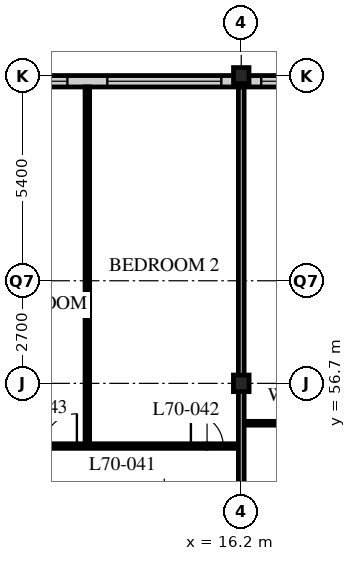
"""IFC4 building model, lengths in metres.
Left out: names, types, materials, properties, quantities, classifications, styles, units other than length and angle.
Written with IfcOpenShell. Run it as: python <this file> out.ifc"""

import sys

from ifc_helpers import new_model, si_unit, direction, frame, frame_2d, origin, origin_2d, place, context, subcontext, project, spatial, rectangle, i_section, extrude, element, fill, save


model = new_model("IFC4")
c1 = context("Model", 3, precision=1e-05, world=origin(), true_north=direction((0.0, 1.0)))
c2 = subcontext(c1, "Body", "Model", "MODEL_VIEW")
j1 = project(units=[si_unit("LENGTHUNIT", "METRE"), si_unit("PLANEANGLEUNIT", "RADIAN")], contexts=[c1])
p1 = place(None, origin())
s1 = spatial("IfcSite", under=j1, at=p1, CompositionType="ELEMENT")
p2 = place(p1, origin())
s2 = spatial("IfcBuilding", under=s1, at=p2, CompositionType="ELEMENT")
p3 = place(p2, frame((0.0, 0.0, 273.6)))
s3 = spatial("IfcBuildingStorey", under=s2, at=p3, CompositionType="ELEMENT", Elevation=273.6)
p4 = place(p3, frame((16.2, 56.7, 0.0), z_axis=(0.0, 0.0, 1.0), x_axis=(1.0, 0.0, 0.0)))
e1 = element("IfcColumn", 1, at=p4, inside=s3, PredefinedType="COLUMN", context=c2, shape_type="SweptSolid", body=[
    extrude(i_section(OverallWidth=0.412, OverallDepth=0.437, WebThickness=0.036, FlangeThickness=0.058, FilletRadius=0.015, at=origin_2d()), origin(), (0.0, 0.0, 1.0), 3.9),
])
p5 = place(p3, frame((16.2, 64.8, 0.0), z_axis=(0.0, 0.0, 1.0), x_axis=(1.0, 0.0, 0.0)))
e2 = element("IfcColumn", 2, at=p5, inside=s3, PredefinedType="COLUMN", context=c2, shape_type="SweptSolid", body=[
    extrude(i_section(OverallWidth=0.407, OverallDepth=0.419, WebThickness=0.031, FlangeThickness=0.049, FilletRadius=0.015, at=origin_2d()), origin(), (0.0, 0.0, 1.0), 3.9),
])
p6 = place(p3, frame((48.3, 64.65, 0.0), z_axis=(0.0, 0.0, 1.0), x_axis=(-1.0, 0.0, 0.0)))
e3 = element("IfcWall", 3, at=p6, inside=s3, PredefinedType="SOLIDWALL", context=c2, shape_type="SweptSolid", body=[
    extrude(rectangle(XDim=40.2, YDim=0.3, at=frame_2d((20.1, 0.0))), origin(), (0.0, 0.0, 1.0), 3.69),
])
p7 = place(p6, frame((0.225, 0.0, 0.6)))
e4 = element("IfcOpeningElement", 4, at=p7, cuts=e3, PredefinedType="OPENING", context=c2, shape_type="SweptSolid", body=[
    extrude(rectangle(XDim=3.0, YDim=2.4, at=frame_2d((1.5, 1.2))), frame((0.0, 0.16, 0.0), z_axis=(0.0, -1.0, 0.0), x_axis=(1.0, 0.0, 0.0)), (0.0, 0.0, 1.0), 0.32),
])
p8 = place(p6, frame((4.275, 0.0, 0.6)))
e5 = element("IfcOpeningElement", 5, at=p8, cuts=e3, PredefinedType="OPENING", context=c2, shape_type="SweptSolid", body=[
    extrude(rectangle(XDim=3.0, YDim=2.4, at=frame_2d((1.5, 1.2))), frame((0.0, 0.16, 0.0), z_axis=(0.0, -1.0, 0.0), x_axis=(1.0, 0.0, 0.0)), (0.0, 0.0, 1.0), 0.32),
])
p9 = place(p6, frame((8.325, 0.0, 0.6)))
e6 = element("IfcOpeningElement", 6, at=p9, cuts=e3, PredefinedType="OPENING", context=c2, shape_type="SweptSolid", body=[
    extrude(rectangle(XDim=3.0, YDim=2.4, at=frame_2d((1.5, 1.2))), frame((0.0, 0.16, 0.0), z_axis=(0.0, -1.0, 0.0), x_axis=(1.0, 0.0, 0.0)), (0.0, 0.0, 1.0), 0.32),
])
p10 = place(p6, frame((12.375, 0.0, 0.6)))
e7 = element("IfcOpeningElement", 7, at=p10, cuts=e3, PredefinedType="OPENING", context=c2, shape_type="SweptSolid", body=[
    extrude(rectangle(XDim=3.0, YDim=2.4, at=frame_2d((1.5, 1.2))), frame((0.0, 0.16, 0.0), z_axis=(0.0, -1.0, 0.0), x_axis=(1.0, 0.0, 0.0)), (0.0, 0.0, 1.0), 0.32),
])
p11 = place(p6, frame((16.425, 0.0, 0.6)))
e8 = element("IfcOpeningElement", 8, at=p11, cuts=e3, PredefinedType="OPENING", context=c2, shape_type="SweptSolid", body=[
    extrude(rectangle(XDim=3.0, YDim=2.4, at=frame_2d((1.5, 1.2))), frame((0.0, 0.16, 0.0), z_axis=(0.0, -1.0, 0.0), x_axis=(1.0, 0.0, 0.0)), (0.0, 0.0, 1.0), 0.32),
])
p12 = place(p6, frame((20.475, 0.0, 0.6)))
e9 = element("IfcOpeningElement", 9, at=p12, cuts=e3, PredefinedType="OPENING", context=c2, shape_type="SweptSolid", body=[
    extrude(rectangle(XDim=3.0, YDim=2.4, at=frame_2d((1.5, 1.2))), frame((0.0, 0.16, 0.0), z_axis=(0.0, -1.0, 0.0), x_axis=(1.0, 0.0, 0.0)), (0.0, 0.0, 1.0), 0.32),
])
p13 = place(p6, frame((24.525, 0.0, 0.6)))
e10 = element("IfcOpeningElement", 10, at=p13, cuts=e3, PredefinedType="OPENING", context=c2, shape_type="SweptSolid", body=[
    extrude(rectangle(XDim=3.0, YDim=2.4, at=frame_2d((1.5, 1.2))), frame((0.0, 0.16, 0.0), z_axis=(0.0, -1.0, 0.0), x_axis=(1.0, 0.0, 0.0)), (0.0, 0.0, 1.0), 0.32),
])
p14 = place(p6, frame((28.575, 0.0, 0.6)))
e11 = element("IfcOpeningElement", 11, at=p14, cuts=e3, PredefinedType="OPENING", context=c2, shape_type="SweptSolid", body=[
    extrude(rectangle(XDim=3.0, YDim=2.4, at=frame_2d((1.5, 1.2))), frame((0.0, 0.16, 0.0), z_axis=(0.0, -1.0, 0.0), x_axis=(1.0, 0.0, 0.0)), (0.0, 0.0, 1.0), 0.32),
])
p15 = place(p6, frame((32.625, 0.0, 0.6)))
e12 = element("IfcOpeningElement", 12, at=p15, cuts=e3, PredefinedType="OPENING", context=c2, shape_type="SweptSolid", body=[
    extrude(rectangle(XDim=3.0, YDim=2.4, at=frame_2d((1.5, 1.2))), frame((0.0, 0.16, 0.0), z_axis=(0.0, -1.0, 0.0), x_axis=(1.0, 0.0, 0.0)), (0.0, 0.0, 1.0), 0.32),
])
p16 = place(p6, frame((36.675, 0.0, 0.6)))
e13 = element("IfcOpeningElement", 13, at=p16, cuts=e3, PredefinedType="OPENING", context=c2, shape_type="SweptSolid", body=[
    extrude(rectangle(XDim=3.0, YDim=2.4, at=frame_2d((1.5, 1.2))), frame((0.0, 0.16, 0.0), z_axis=(0.0, -1.0, 0.0), x_axis=(1.0, 0.0, 0.0)), (0.0, 0.0, 1.0), 0.32),
])
p17 = place(p3, frame((16.2, 55.65, 0.0), z_axis=(0.0, 0.0, 1.0), x_axis=(1.0, 0.0, 0.0)))
e14 = element("IfcWall", 14, at=p17, inside=s3, PredefinedType="PARTITIONING", context=c2, shape_type="SweptSolid", body=[
    extrude(rectangle(XDim=2.2, YDim=0.1, at=frame_2d((1.1, 0.0))), origin(), (0.0, 0.0, 1.0), 3.69),
])
p18 = place(p3, frame((8.15, 55.05, 0.0), z_axis=(0.0, 0.0, 1.0), x_axis=(1.0, 0.0, 0.0)))
e15 = element("IfcWall", 15, at=p18, inside=s3, PredefinedType="PARTITIONING", context=c2, shape_type="SweptSolid", body=[
    extrude(rectangle(XDim=8.05, YDim=0.12, at=frame_2d((4.025, 0.0))), origin(), (0.0, 0.0, 1.0), 3.69),
])
p19 = place(p18, frame((6.725, 0.0, 0.0)))
e16 = element("IfcOpeningElement", 16, at=p19, cuts=e15, PredefinedType="OPENING", context=c2, shape_type="SweptSolid", body=[
    extrude(rectangle(XDim=0.85, YDim=2.1, at=frame_2d((0.425, 1.05))), frame((0.0, 0.07, 0.0), z_axis=(0.0, -1.0, 0.0), x_axis=(1.0, 0.0, 0.0)), (0.0, 0.0, 1.0), 0.14),
])
p20 = place(p18, frame((2.875, 0.0, 0.0)))
e17 = element("IfcOpeningElement", 17, at=p20, cuts=e15, PredefinedType="OPENING", context=c2, shape_type="SweptSolid", body=[
    extrude(rectangle(XDim=0.85, YDim=2.1, at=frame_2d((0.425, 1.05))), frame((0.0, 0.07, 0.0), z_axis=(0.0, -1.0, 0.0), x_axis=(1.0, 0.0, 0.0)), (0.0, 0.0, 1.0), 0.14),
])
p21 = place(p3, frame((12.15, 55.05, 0.0), z_axis=(0.0, 0.0, 1.0), x_axis=(0.0, 1.0, 0.0)))
e18 = element("IfcWall", 18, at=p21, inside=s3, PredefinedType="PARTITIONING", context=c2, shape_type="SweptSolid", body=[
    extrude(rectangle(XDim=9.45, YDim=0.12, at=frame_2d((4.725, 0.0))), origin(), (0.0, 0.0, 1.0), 3.69),
])
p22 = place(p3, frame((16.2, 52.65, 0.0), z_axis=(0.0, 0.0, 1.0), x_axis=(0.0, 1.0, 0.0)))
e19 = element("IfcWall", 19, at=p22, inside=s3, PredefinedType="PARTITIONING", context=c2, shape_type="SweptSolid", body=[
    extrude(rectangle(XDim=11.85, YDim=0.15, at=frame_2d((5.925, 0.0))), origin(), (0.0, 0.0, 1.0), 3.078),
])
p23 = place(p14, origin())
e20 = element("IfcWindow", 20, at=p23, inside=s3, PartitioningType="SINGLE_PANEL", PredefinedType="WINDOW", context=c2, shape_type="SweptSolid", body=[
    extrude(rectangle(XDim=3.0, YDim=2.4, at=frame_2d((1.5, 1.2))), frame((0.0, 0.03, 0.0), z_axis=(0.0, -1.0, 0.0), x_axis=(1.0, 0.0, 0.0)), (0.0, 0.0, 1.0), 0.06),
])
fill(e11, e20)
p24 = place(p15, origin())
e21 = element("IfcWindow", 21, at=p24, inside=s3, PartitioningType="SINGLE_PANEL", PredefinedType="WINDOW", context=c2, shape_type="SweptSolid", body=[
    extrude(rectangle(XDim=3.0, YDim=2.4, at=frame_2d((1.5, 1.2))), frame((0.0, 0.03, 0.0), z_axis=(0.0, -1.0, 0.0), x_axis=(1.0, 0.0, 0.0)), (0.0, 0.0, 1.0), 0.06),
])
fill(e12, e21)
p25 = place(p16, origin())
e22 = element("IfcWindow", 22, at=p25, inside=s3, PartitioningType="SINGLE_PANEL", PredefinedType="WINDOW", context=c2, shape_type="SweptSolid", body=[
    extrude(rectangle(XDim=3.0, YDim=2.4, at=frame_2d((1.5, 1.2))), frame((0.0, 0.03, 0.0), z_axis=(0.0, -1.0, 0.0), x_axis=(1.0, 0.0, 0.0)), (0.0, 0.0, 1.0), 0.06),
])
fill(e13, e22)
p26 = place(p19, origin())
e23 = element("IfcDoor", 23, at=p26, inside=s3, OperationType="SINGLE_SWING_LEFT", PredefinedType="DOOR", context=c2, shape_type="SweptSolid", body=[
    extrude(rectangle(XDim=0.85, YDim=2.1, at=frame_2d((0.425, 1.05))), frame((0.0, 0.025, 0.0), z_axis=(0.0, -1.0, 0.0), x_axis=(1.0, 0.0, 0.0)), (0.0, 0.0, 1.0), 0.05),
])
fill(e16, e23)
p27 = place(p20, origin())
e24 = element("IfcDoor", 24, at=p27, inside=s3, OperationType="SINGLE_SWING_RIGHT", PredefinedType="DOOR", context=c2, shape_type="SweptSolid", body=[
    extrude(rectangle(XDim=0.85, YDim=2.1, at=frame_2d((0.425, 1.05))), frame((0.0, 0.025, 0.0), z_axis=(0.0, -1.0, 0.0), x_axis=(1.0, 0.0, 0.0)), (0.0, 0.0, 1.0), 0.05),
])
fill(e17, e24)
save(model, sys.argv[1])
